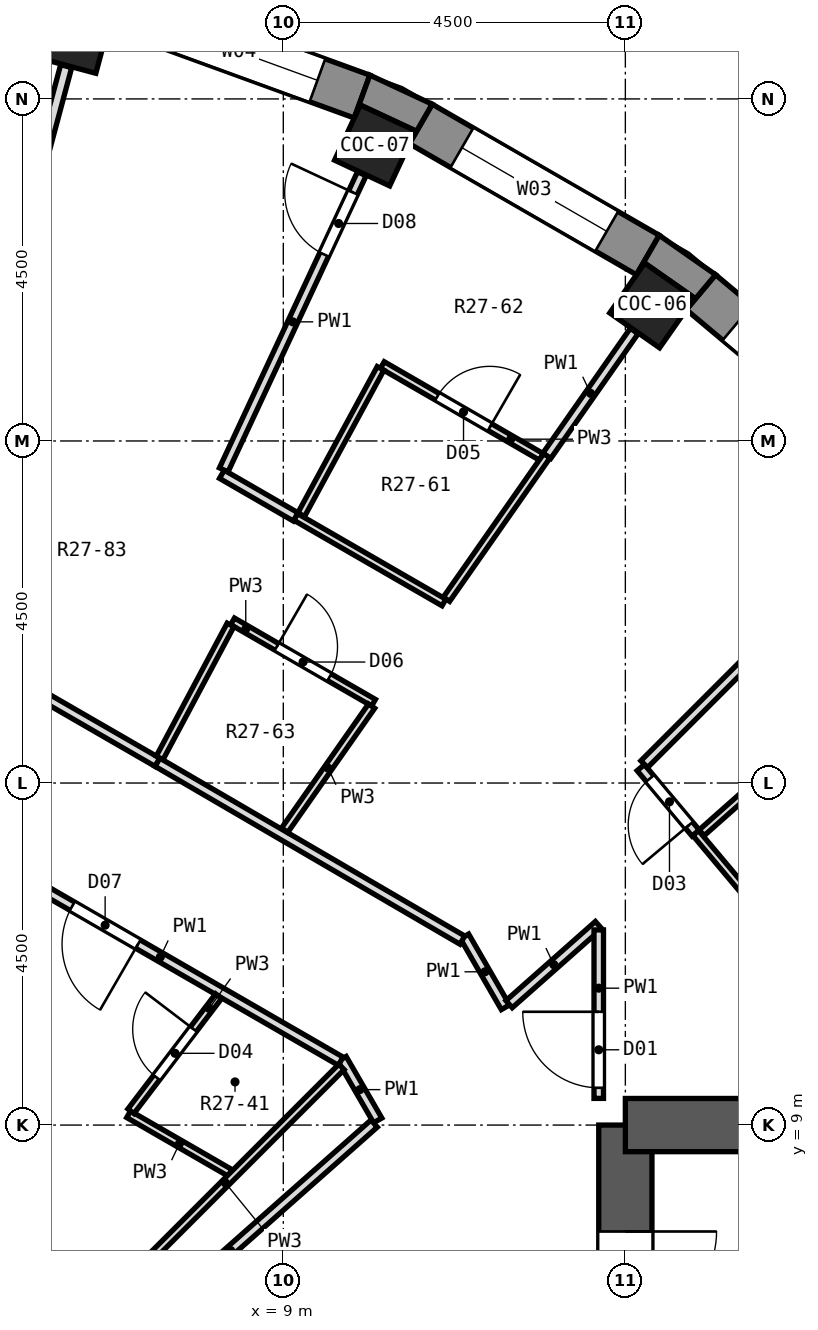
"""IFC4 building model, lengths in metres.
Left out: names, types, materials, properties, quantities, classifications, styles, units other than length and angle.
Written with IfcOpenShell. Run it as: python <this file> out.ifc"""

import sys

from ifc_helpers import new_model, si_unit, direction, frame, frame_2d, origin, origin_2d, place, context, subcontext, project, spatial, polyline, rectangle, outline, extrude, element, fill, save


model = new_model("IFC4")
c1 = context("Model", 3, precision=1e-05, world=origin(), true_north=direction((0.0, 1.0)))
c2 = subcontext(c1, "Body", "Model", "MODEL_VIEW")
j1 = project(units=[si_unit("LENGTHUNIT", "METRE"), si_unit("PLANEANGLEUNIT", "RADIAN")], contexts=[c1])
p1 = place(None, origin())
s1 = spatial("IfcSite", under=j1, at=p1, CompositionType="ELEMENT")
p2 = place(p1, origin())
s2 = spatial("IfcBuilding", under=s1, at=p2, CompositionType="ELEMENT")
p3 = place(p2, frame((0.0, 0.0, 180.6)))
s3 = spatial("IfcBuildingStorey", under=s2, at=p3, CompositionType="ELEMENT", Elevation=180.6)
for number, where, z_axis, x_axis in (
    (1, (13.852, 19.782, 0.0), (0.0, 0.0, 1.0), (0.574, 0.819, 0.0)),
    (2, (10.206, 21.887, 0.0), (0.0, 0.0, 1.0), (0.423, 0.906, 0.0)),
    (3, (6.25, 23.327, 0.0), (0.0, 0.0, 1.0), (0.259, 0.966, 0.0)),
):
    element("IfcColumn", number, at=place(p3, frame(where, z_axis=z_axis, x_axis=x_axis)), inside=s3, PredefinedType="COLUMN", context=c2, shape_type="SweptSolid", body=[
        extrude(rectangle(XDim=0.8, YDim=0.8, at=origin_2d()), origin(), (0.0, 0.0, 1.0), 3.3),
    ])
p4 = place(p3, frame((13.5, -9.0, 0.0), z_axis=(0.0, 0.0, 1.0), x_axis=(0.0, 1.0, 0.0)))
e4 = element("IfcWall", 4, at=p4, inside=s3, PredefinedType="SHEAR", context=c2, shape_type="SweptSolid", body=[
    extrude(rectangle(XDim=18.0, YDim=0.7, at=frame_2d((9.0, 0.0))), origin(), (0.0, 0.0, 1.0), 3.3),
])
p5 = place(p4, frame((15.4, 0.0, 0.0)))
e5 = element("IfcOpeningElement", 5, at=p5, cuts=e4, PredefinedType="OPENING", context=c2, shape_type="SweptSolid", body=[
    extrude(rectangle(XDim=1.2, YDim=2.1, at=frame_2d((0.6, 1.05))), frame((0.0, 0.362, 0.0), z_axis=(0.0, -1.0, 0.0), x_axis=(1.0, 0.0, 0.0)), (0.0, 0.0, 1.0), 0.724),
])
p6 = place(p4, frame((1.4, 0.0, 0.0)))
e6 = element("IfcOpeningElement", 6, at=p6, cuts=e4, PredefinedType="OPENING", context=c2, shape_type="SweptSolid", body=[
    extrude(rectangle(XDim=1.2, YDim=2.1, at=frame_2d((0.6, 1.05))), frame((0.0, 0.362, 0.0), z_axis=(0.0, -1.0, 0.0), x_axis=(1.0, 0.0, 0.0)), (0.0, 0.0, 1.0), 0.724),
])
p7 = place(p4, frame((7.5, 0.0, 0.0)))
e7 = element("IfcOpeningElement", 7, at=p7, cuts=e4, PredefinedType="OPENING", context=c2, shape_type="SweptSolid", body=[
    extrude(rectangle(XDim=3.0, YDim=2.4, at=frame_2d((1.5, 1.2))), frame((0.0, 0.362, 0.0), z_axis=(0.0, -1.0, 0.0), x_axis=(1.0, 0.0, 0.0)), (0.0, 0.0, 1.0), 0.724),
])
p8 = place(p3, frame((13.5, 9.0, 0.0), z_axis=(0.0, 0.0, 1.0), x_axis=(1.0, 0.0, 0.0)))
e8 = element("IfcWall", 8, at=p8, inside=s3, PredefinedType="SHEAR", context=c2, shape_type="SweptSolid", body=[
    extrude(rectangle(XDim=8.0, YDim=0.7, at=frame_2d((4.0, 0.0))), origin(), (0.0, 0.0, 1.0), 3.3),
])
p9 = place(p3, frame((17.137, 17.74, 0.0), z_axis=(0.0, 0.0, 1.0), x_axis=(-0.766058884809, 0.642770398358, 0.0)))
e9 = element("IfcWall", 9, at=p9, inside=s3, PredefinedType="SOLIDWALL", context=c2, shape_type="SweptSolid", body=[
    extrude(rectangle(XDim=3.449, YDim=0.6, at=frame_2d((1.725, 0.0))), origin(), (0.0, 0.0, 1.0), 2.85),
])
p10 = place(p9, frame((0.625, 0.0, 0.9)))
e10 = element("IfcOpeningElement", 10, at=p10, cuts=e9, PredefinedType="OPENING", context=c2, shape_type="SweptSolid", body=[
    extrude(rectangle(XDim=2.2, YDim=1.8, at=frame_2d((1.1, 0.9))), frame((0.0, 0.312, 0.0), z_axis=(0.0, -1.0, 0.0), x_axis=(1.0, 0.0, 0.0)), (0.0, 0.0, 1.0), 0.624),
])
p11 = place(p3, frame((13.796, 20.446, 0.0), z_axis=(0.0, 0.0, 1.0), x_axis=(-0.86602648383, 0.499998129301, 0.0)))
e11 = element("IfcWall", 11, at=p11, inside=s3, PredefinedType="SOLIDWALL", context=c2, shape_type="SweptSolid", body=[
    extrude(rectangle(XDim=3.45, YDim=0.6, at=frame_2d((1.725, 0.0))), origin(), (0.0, 0.0, 1.0), 2.85),
])
p12 = place(p11, frame((0.625, 0.0, 0.9)))
e12 = element("IfcOpeningElement", 12, at=p12, cuts=e11, PredefinedType="OPENING", context=c2, shape_type="SweptSolid", body=[
    extrude(rectangle(XDim=2.2, YDim=1.8, at=frame_2d((1.1, 0.9))), frame((0.0, 0.312, 0.0), z_axis=(0.0, -1.0, 0.0), x_axis=(1.0, 0.0, 0.0)), (0.0, 0.0, 1.0), 0.624),
])
p13 = place(p3, frame((10.036, 22.531, 0.0), z_axis=(0.0, 0.0, 1.0), x_axis=(-0.93968799822, 0.342032843455, 0.0)))
e13 = element("IfcWall", 13, at=p13, inside=s3, PredefinedType="SOLIDWALL", context=c2, shape_type="SweptSolid", body=[
    extrude(rectangle(XDim=3.45, YDim=0.6, at=frame_2d((1.725, 0.0))), origin(), (0.0, 0.0, 1.0), 2.85),
])
p14 = place(p13, frame((0.625, 0.0, 0.9)))
e14 = element("IfcOpeningElement", 14, at=p14, cuts=e13, PredefinedType="OPENING", context=c2, shape_type="SweptSolid", body=[
    extrude(rectangle(XDim=2.2, YDim=1.8, at=frame_2d((1.1, 0.9))), frame((0.0, 0.312, 0.0), z_axis=(0.0, -1.0, 0.0), x_axis=(1.0, 0.0, 0.0)), (0.0, 0.0, 1.0), 0.624),
])
p15 = place(p3, origin())
e15 = element("IfcWall", 15, at=p15, inside=s3, PredefinedType="SOLIDWALL", context=c2, shape_type="SweptSolid", body=[
    extrude(outline(polyline([(14.687, 20.187), (13.946, 20.706), (13.646, 20.186), (13.754, 20.34), (14.409, 19.881), (14.302, 19.727), (14.687, 20.187)])), origin(), (0.0, 0.0, 1.0), 2.85),
])
p16 = place(p3, origin())
e16 = element("IfcWall", 16, at=p16, inside=s3, PredefinedType="SOLIDWALL", context=c2, shape_type="SweptSolid", body=[
    extrude(outline(polyline([(10.139, 22.813), (9.934, 22.249), (10.013, 22.419), (10.738, 22.081), (10.659, 21.911), (10.959, 22.431), (10.139, 22.813)])), origin(), (0.0, 0.0, 1.0), 2.85),
])
p17 = place(p3, frame((5.826, 6.22, 0.0), z_axis=(0.0, 0.0, 1.0), x_axis=(-0.866005929495, 0.500033728941, 0.0)))
e17 = element("IfcWall", 17, at=p17, inside=s3, PredefinedType="SOLIDWALL", context=c2, shape_type="SweptSolid", body=[
    extrude(rectangle(XDim=3.87, YDim=0.6, at=frame_2d((1.935, 0.0))), origin(), (0.0, 0.0, 1.0), 2.85),
])
p18 = place(p17, frame((0.735, 0.0, 0.9)))
e18 = element("IfcOpeningElement", 18, at=p18, cuts=e17, PredefinedType="OPENING", context=c2, shape_type="SweptSolid", body=[
    extrude(rectangle(XDim=2.4, YDim=1.8, at=frame_2d((1.2, 0.9))), frame((0.0, 0.312, 0.0), z_axis=(0.0, -1.0, 0.0), x_axis=(1.0, 0.0, 0.0)), (0.0, 0.0, 1.0), 0.624),
])
p19 = place(p3, frame((11.384, 11.482, 0.0), z_axis=(0.0, 0.0, 1.0), x_axis=(0.500016891966, -0.866015650984, 0.0)))
e19 = element("IfcWall", 19, at=p19, inside=s3, PredefinedType="PARTITIONING", context=c2, shape_type="SweptSolid", body=[
    extrude(rectangle(XDim=1.077, YDim=0.125, at=frame_2d((0.538, 0.0))), origin(), (0.0, 0.0, 1.0), 2.85),
])
p20 = place(p3, frame((9.773, 9.871, 0.0), z_axis=(0.0, 0.0, 1.0), x_axis=(0.501046552025, -0.865420332962, 0.0)))
e20 = element("IfcWall", 20, at=p20, inside=s3, PredefinedType="PARTITIONING", context=c2, shape_type="SweptSolid", body=[
    extrude(rectangle(XDim=0.936, YDim=0.125, at=frame_2d((0.468, 0.0))), origin(), (0.0, 0.0, 1.0), 2.85),
])
p21 = place(p3, frame((14.425, 12.842, 0.0), z_axis=(0.0, 0.0, 1.0), x_axis=(0.642729690631, -0.766093039246, 0.0)))
e21 = element("IfcWall", 21, at=p21, inside=s3, PredefinedType="PARTITIONING", context=c2, shape_type="SweptSolid", body=[
    extrude(rectangle(XDim=2.205, YDim=0.1, at=frame_2d((1.102, 0.0))), origin(), (0.0, 0.0, 1.0), 2.85),
])
p22 = place(p3, frame((13.703, 13.703, 0.0), z_axis=(0.0, 0.0, 1.0), x_axis=(0.642682228496, -0.766132856087, 0.0)))
e22 = element("IfcWall", 22, at=p22, inside=s3, PredefinedType="PARTITIONING", context=c2, shape_type="SweptSolid", body=[
    extrude(rectangle(XDim=1.123, YDim=0.125, at=frame_2d((0.562, 0.0))), origin(), (0.0, 0.0, 1.0), 2.85),
])
p23 = place(p22, frame((0.188, 0.0, 0.0)))
e23 = element("IfcOpeningElement", 23, at=p23, cuts=e22, PredefinedType="OPENING", context=c2, shape_type="SweptSolid", body=[
    extrude(rectangle(XDim=0.8, YDim=2.1, at=frame_2d((0.4, 1.05))), frame((0.0, 0.074, 0.0), z_axis=(0.0, -1.0, 0.0), x_axis=(1.0, 0.0, 0.0)), (0.0, 0.0, 1.0), 0.149),
])
p24 = place(p3, frame((7.343, 13.774, 0.0), z_axis=(0.0, 0.0, 1.0), x_axis=(0.86377127644, -0.503884095796, 0.0)))
e24 = element("IfcWall", 24, at=p24, inside=s3, PredefinedType="PARTITIONING", context=c2, shape_type="SweptSolid", body=[
    extrude(rectangle(XDim=4.646, YDim=0.125, at=frame_2d((2.323, 0.0))), origin(), (0.0, 0.0, 1.0), 2.85),
])
p25 = place(p3, frame((6.965, 9.142, 0.0), z_axis=(0.0, 0.0, 1.0), x_axis=(0.865956409518, -0.500119482538, 0.0)))
e25 = element("IfcWall", 25, at=p25, inside=s3, PredefinedType="PARTITIONING", context=c2, shape_type="SweptSolid", body=[
    extrude(rectangle(XDim=1.543, YDim=0.1, at=frame_2d((0.772, 0.0))), origin(), (0.0, 0.0, 1.0), 2.85),
])
p26 = place(p3, frame((3.529, 13.436, 0.0), z_axis=(0.0, 0.0, 1.0), x_axis=(0.865968995572, -0.500097689165, 0.0)))
e26 = element("IfcWall", 26, at=p26, inside=s3, PredefinedType="PARTITIONING", context=c2, shape_type="SweptSolid", body=[
    extrude(rectangle(XDim=7.19, YDim=0.125, at=frame_2d((3.595, 0.0))), origin(), (0.0, 0.0, 1.0), 2.85),
])
p27 = place(p26, frame((3.112, 0.0, 0.0)))
e27 = element("IfcOpeningElement", 27, at=p27, cuts=e26, PredefinedType="OPENING", context=c2, shape_type="SweptSolid", body=[
    extrude(rectangle(XDim=1.0, YDim=2.1, at=frame_2d((0.5, 1.05))), frame((0.0, 0.074, 0.0), z_axis=(0.0, -1.0, 0.0), x_axis=(1.0, 0.0, 0.0)), (0.0, 0.0, 1.0), 0.149),
])
p28 = place(p3, frame((4.117, 15.636, 0.0), z_axis=(0.0, 0.0, 1.0), x_axis=(0.866036031404, -0.49998159197, 0.0)))
e28 = element("IfcWall", 28, at=p28, inside=s3, PredefinedType="PARTITIONING", context=c2, shape_type="SweptSolid", body=[
    extrude(rectangle(XDim=3.724, YDim=0.125, at=frame_2d((1.862, 0.0))), origin(), (0.0, 0.0, 1.0), 2.85),
])
p29 = place(p3, frame((8.333, 15.627, 0.0), z_axis=(0.0, 0.0, 1.0), x_axis=(0.866024183959, -0.500002112793, 0.0)))
e29 = element("IfcWall", 29, at=p29, inside=s3, PredefinedType="PARTITIONING", context=c2, shape_type="SweptSolid", body=[
    extrude(rectangle(XDim=2.141, YDim=0.1, at=frame_2d((1.071, 0.0))), origin(), (0.0, 0.0, 1.0), 2.85),
])
p30 = place(p29, frame((0.67, 0.0, 0.0)))
e30 = element("IfcOpeningElement", 30, at=p30, cuts=e29, PredefinedType="OPENING", context=c2, shape_type="SweptSolid", body=[
    extrude(rectangle(XDim=0.8, YDim=2.1, at=frame_2d((0.4, 1.05))), frame((0.0, 0.062, 0.0), z_axis=(0.0, -1.0, 0.0), x_axis=(1.0, 0.0, 0.0)), (0.0, 0.0, 1.0), 0.124),
])
p31 = place(p3, frame((9.163, 17.001, 0.0), z_axis=(0.0, 0.0, 1.0), x_axis=(0.866073680794, -0.499916372443, 0.0)))
e31 = element("IfcWall", 31, at=p31, inside=s3, PredefinedType="PARTITIONING", context=c2, shape_type="SweptSolid", body=[
    extrude(rectangle(XDim=2.252, YDim=0.1, at=frame_2d((1.126, 0.0))), origin(), (0.0, 0.0, 1.0), 2.85),
])
p32 = place(p3, frame((8.192, 17.562, 0.0), z_axis=(0.0, 0.0, 1.0), x_axis=(0.865888132195, -0.500237686029, 0.0)))
e32 = element("IfcWall", 32, at=p32, inside=s3, PredefinedType="PARTITIONING", context=c2, shape_type="SweptSolid", body=[
    extrude(rectangle(XDim=1.121, YDim=0.125, at=frame_2d((0.561, 0.0))), origin(), (0.0, 0.0, 1.0), 2.85),
])
p33 = place(p3, frame((10.303, 18.999, 0.0), z_axis=(0.0, 0.0, 1.0), x_axis=(0.865870907928, -0.500267499248, 0.0)))
e33 = element("IfcWall", 33, at=p33, inside=s3, PredefinedType="PARTITIONING", context=c2, shape_type="SweptSolid", body=[
    extrude(rectangle(XDim=2.417, YDim=0.1, at=frame_2d((1.208, 0.0))), origin(), (0.0, 0.0, 1.0), 2.85),
])
p34 = place(p33, frame((0.833, 0.0, 0.0)))
e34 = element("IfcOpeningElement", 34, at=p34, cuts=e33, PredefinedType="OPENING", context=c2, shape_type="SweptSolid", body=[
    extrude(rectangle(XDim=0.8, YDim=2.1, at=frame_2d((0.4, 1.05))), frame((0.0, 0.062, 0.0), z_axis=(0.0, -1.0, 0.0), x_axis=(1.0, 0.0, 0.0)), (0.0, 0.0, 1.0), 0.124),
])
p35 = place(p3, frame((14.504, 12.845, 0.0), z_axis=(0.0, 0.0, 1.0), x_axis=(0.748608753718, 0.663012016374, 0.0)))
e35 = element("IfcWall", 35, at=p35, inside=s3, PredefinedType="PARTITIONING", context=c2, shape_type="SweptSolid", body=[
    extrude(rectangle(XDim=2.188, YDim=0.1, at=frame_2d((1.094, 0.0))), origin(), (0.0, 0.0, 1.0), 2.85),
])
p36 = place(p3, frame((6.42, 5.68, 0.0), z_axis=(0.0, 0.0, 1.0), x_axis=(0.74896790207, 0.662606279527, 0.0)))
e36 = element("IfcWall", 36, at=p36, inside=s3, PredefinedType="PARTITIONING", context=c2, shape_type="SweptSolid", body=[
    extrude(rectangle(XDim=5.041, YDim=0.125, at=frame_2d((2.52, 0.0))), origin(), (0.0, 0.0, 1.0), 2.85),
])
p37 = place(p3, frame((11.97, 10.59, 0.0), z_axis=(0.0, 0.0, 1.0), x_axis=(0.748916466518, 0.66266441445, 0.0)))
e37 = element("IfcWall", 37, at=p37, inside=s3, PredefinedType="PARTITIONING", context=c2, shape_type="SweptSolid", body=[
    extrude(rectangle(XDim=1.571, YDim=0.125, at=frame_2d((0.786, 0.0))), origin(), (0.0, 0.0, 1.0), 2.85),
])
p38 = place(p3, frame((6.712, 6.712, 0.0), z_axis=(0.0, 0.0, 1.0), x_axis=(0.707106781187, 0.707106781187, 0.0)))
e38 = element("IfcWall", 38, at=p38, inside=s3, PredefinedType="PARTITIONING", context=c2, shape_type="SweptSolid", body=[
    extrude(rectangle(XDim=4.318, YDim=0.1, at=frame_2d((2.159, 0.0))), origin(), (0.0, 0.0, 1.0), 2.85),
])
p39 = place(p3, frame((13.748, 13.748, 0.0), z_axis=(0.0, 0.0, 1.0), x_axis=(0.707106781187, 0.707106781187, 0.0)))
e39 = element("IfcWall", 39, at=p39, inside=s3, PredefinedType="PARTITIONING", context=c2, shape_type="SweptSolid", body=[
    extrude(rectangle(XDim=4.297, YDim=0.125, at=frame_2d((2.148, 0.0))), origin(), (0.0, 0.0, 1.0), 2.85),
])
p40 = place(p3, frame((6.995, 9.182, 0.0), z_axis=(0.0, 0.0, 1.0), x_axis=(0.606016164932, 0.795452329081, 0.0)))
e40 = element("IfcWall", 40, at=p40, inside=s3, PredefinedType="PARTITIONING", context=c2, shape_type="SweptSolid", body=[
    extrude(rectangle(XDim=1.904, YDim=0.1, at=frame_2d((0.952, 0.0))), origin(), (0.0, 0.0, 1.0), 2.85),
])
p41 = place(p40, frame((0.558, 0.0, 0.0)))
e41 = element("IfcOpeningElement", 41, at=p41, cuts=e40, PredefinedType="OPENING", context=c2, shape_type="SweptSolid", body=[
    extrude(rectangle(XDim=0.8, YDim=2.1, at=frame_2d((0.4, 1.05))), frame((0.0, 0.062, 0.0), z_axis=(0.0, -1.0, 0.0), x_axis=(1.0, 0.0, 0.0)), (0.0, 0.0, 1.0), 0.124),
])
p42 = place(p3, frame((11.147, 15.918, 0.0), z_axis=(0.0, 0.0, 1.0), x_axis=(0.573270276117, 0.819366334749, 0.0)))
e42 = element("IfcWall", 42, at=p42, inside=s3, PredefinedType="PARTITIONING", context=c2, shape_type="SweptSolid", body=[
    extrude(rectangle(XDim=2.303, YDim=0.1, at=frame_2d((1.152, 0.0))), origin(), (0.0, 0.0, 1.0), 2.85),
])
p43 = place(p3, frame((9.018, 12.879, 0.0), z_axis=(0.0, 0.0, 1.0), x_axis=(0.573717150032, 0.819053497495, 0.0)))
e43 = element("IfcWall", 43, at=p43, inside=s3, PredefinedType="PARTITIONING", context=c2, shape_type="SweptSolid", body=[
    extrude(rectangle(XDim=1.993, YDim=0.1, at=frame_2d((0.997, 0.0))), origin(), (0.0, 0.0, 1.0), 2.85),
])
p44 = place(p3, frame((12.468, 17.806, 0.0), z_axis=(0.0, 0.0, 1.0), x_axis=(0.573568678046, 0.819157476658, 0.0)))
e44 = element("IfcWall", 44, at=p44, inside=s3, PredefinedType="PARTITIONING", context=c2, shape_type="SweptSolid", body=[
    extrude(rectangle(XDim=2.003, YDim=0.125, at=frame_2d((1.001, 0.0))), origin(), (0.0, 0.0, 1.0), 2.85),
])
p45 = place(p3, frame((9.236, 17.031, 0.0), z_axis=(0.0, 0.0, 1.0), x_axis=(0.476638861042, 0.87909919585, 0.0)))
e45 = element("IfcWall", 45, at=p45, inside=s3, PredefinedType="PARTITIONING", context=c2, shape_type="SweptSolid", body=[
    extrude(rectangle(XDim=2.189, YDim=0.1, at=frame_2d((1.094, 0.0))), origin(), (0.0, 0.0, 1.0), 2.85),
])
p46 = place(p3, frame((7.374, 13.831, 0.0), z_axis=(0.0, 0.0, 1.0), x_axis=(0.470274863267, 0.882520001461, 0.0)))
e46 = element("IfcWall", 46, at=p46, inside=s3, PredefinedType="PARTITIONING", context=c2, shape_type="SweptSolid", body=[
    extrude(rectangle(XDim=1.982, YDim=0.1, at=frame_2d((0.991, 0.0))), origin(), (0.0, 0.0, 1.0), 2.85),
])
p47 = place(p3, frame((8.216, 17.62, 0.0), z_axis=(0.0, 0.0, 1.0), x_axis=(0.422602512205, 0.906315130999, 0.0)))
e47 = element("IfcWall", 47, at=p47, inside=s3, PredefinedType="PARTITIONING", context=c2, shape_type="SweptSolid", body=[
    extrude(rectangle(XDim=4.299, YDim=0.125, at=frame_2d((2.149, 0.0))), origin(), (0.0, 0.0, 1.0), 2.85),
])
p48 = place(p47, frame((3.127, 0.0, 0.0)))
e48 = element("IfcOpeningElement", 48, at=p48, cuts=e47, PredefinedType="OPENING", context=c2, shape_type="SweptSolid", body=[
    extrude(rectangle(XDim=0.9, YDim=2.1, at=frame_2d((0.45, 1.05))), frame((0.0, 0.074, 0.0), z_axis=(0.0, -1.0, 0.0), x_axis=(1.0, 0.0, 0.0)), (0.0, 0.0, 1.0), 0.149),
])
p49 = place(p3, frame((4.198, 15.663, 0.0), z_axis=(0.0, 0.0, 1.0), x_axis=(0.258633906583, 0.96597541499, 0.0)))
e49 = element("IfcWall", 49, at=p49, inside=s3, PredefinedType="PARTITIONING", context=c2, shape_type="SweptSolid", body=[
    extrude(rectangle(XDim=7.524, YDim=0.15, at=frame_2d((3.762, 0.0))), origin(), (0.0, 0.0, 1.0), 2.85),
])
p50 = place(p3, frame((13.15, 9.351, 0.0), z_axis=(0.0, 0.0, 1.0), x_axis=(0.0, 1.0, 0.0)))
e50 = element("IfcWall", 50, at=p50, inside=s3, PredefinedType="PARTITIONING", context=c2, shape_type="SweptSolid", body=[
    extrude(rectangle(XDim=2.216, YDim=0.125, at=frame_2d((1.108, 0.0))), origin(), (0.0, 0.0, 1.0), 2.85),
])
p51 = place(p50, frame((0.139, 0.0, 0.0)))
e51 = element("IfcOpeningElement", 51, at=p51, cuts=e50, PredefinedType="OPENING", context=c2, shape_type="SweptSolid", body=[
    extrude(rectangle(XDim=1.0, YDim=2.1, at=frame_2d((0.5, 1.05))), frame((0.0, 0.074, 0.0), z_axis=(0.0, -1.0, 0.0), x_axis=(1.0, 0.0, 0.0)), (0.0, 0.0, 1.0), 0.149),
])
p52 = place(p10, origin())
e52 = element("IfcWindow", 52, at=p52, inside=s3, PartitioningType="SINGLE_PANEL", PredefinedType="WINDOW", context=c2, shape_type="SweptSolid", body=[
    extrude(rectangle(XDim=2.2, YDim=1.8, at=frame_2d((1.1, 0.9))), frame((0.0, 0.18, 0.0), z_axis=(0.0, -1.0, 0.0), x_axis=(1.0, 0.0, 0.0)), (0.0, 0.0, 1.0), 0.06),
])
fill(e10, e52)
p53 = place(p12, origin())
e53 = element("IfcWindow", 53, at=p53, inside=s3, PartitioningType="SINGLE_PANEL", PredefinedType="WINDOW", context=c2, shape_type="SweptSolid", body=[
    extrude(rectangle(XDim=2.2, YDim=1.8, at=frame_2d((1.1, 0.9))), frame((0.0, 0.18, 0.0), z_axis=(0.0, -1.0, 0.0), x_axis=(1.0, 0.0, 0.0)), (0.0, 0.0, 1.0), 0.06),
])
fill(e12, e53)
p54 = place(p14, origin())
e54 = element("IfcWindow", 54, at=p54, inside=s3, PartitioningType="SINGLE_PANEL", PredefinedType="WINDOW", context=c2, shape_type="SweptSolid", body=[
    extrude(rectangle(XDim=2.2, YDim=1.8, at=frame_2d((1.1, 0.9))), frame((0.0, 0.18, 0.0), z_axis=(0.0, -1.0, 0.0), x_axis=(1.0, 0.0, 0.0)), (0.0, 0.0, 1.0), 0.06),
])
fill(e14, e54)
p55 = place(p51, origin())
e55 = element("IfcDoor", 55, at=p55, inside=s3, OperationType="SINGLE_SWING_RIGHT", PredefinedType="DOOR", context=c2, shape_type="SweptSolid", body=[
    extrude(rectangle(XDim=1.0, YDim=2.1, at=frame_2d((0.5, 1.05))), frame((0.0, 0.025, 0.0), z_axis=(0.0, -1.0, 0.0), x_axis=(1.0, 0.0, 0.0)), (0.0, 0.0, 1.0), 0.05),
])
fill(e51, e55)
p56 = place(p23, frame((0.8, 0.0, 0.0), z_axis=(0.0, 0.0, 1.0), x_axis=(-1.0, 0.0, 0.0)))
e56 = element("IfcDoor", 56, at=p56, inside=s3, OperationType="SINGLE_SWING_LEFT", PredefinedType="DOOR", context=c2, shape_type="SweptSolid", body=[
    extrude(rectangle(XDim=0.8, YDim=2.1, at=frame_2d((0.4, 1.05))), frame((0.0, 0.025, 0.0), z_axis=(0.0, -1.0, 0.0), x_axis=(1.0, 0.0, 0.0)), (0.0, 0.0, 1.0), 0.05),
])
fill(e23, e56)
p57 = place(p41, origin())
e57 = element("IfcDoor", 57, at=p57, inside=s3, OperationType="SINGLE_SWING_RIGHT", PredefinedType="DOOR", context=c2, shape_type="SweptSolid", body=[
    extrude(rectangle(XDim=0.8, YDim=2.1, at=frame_2d((0.4, 1.05))), frame((0.0, 0.025, 0.0), z_axis=(0.0, -1.0, 0.0), x_axis=(1.0, 0.0, 0.0)), (0.0, 0.0, 1.0), 0.05),
])
fill(e41, e57)
p58 = place(p34, origin())
e58 = element("IfcDoor", 58, at=p58, inside=s3, OperationType="SINGLE_SWING_RIGHT", PredefinedType="DOOR", context=c2, shape_type="SweptSolid", body=[
    extrude(rectangle(XDim=0.8, YDim=2.1, at=frame_2d((0.4, 1.05))), frame((0.0, 0.025, 0.0), z_axis=(0.0, -1.0, 0.0), x_axis=(1.0, 0.0, 0.0)), (0.0, 0.0, 1.0), 0.05),
])
fill(e34, e58)
p59 = place(p30, origin())
e59 = element("IfcDoor", 59, at=p59, inside=s3, OperationType="SINGLE_SWING_LEFT", PredefinedType="DOOR", context=c2, shape_type="SweptSolid", body=[
    extrude(rectangle(XDim=0.8, YDim=2.1, at=frame_2d((0.4, 1.05))), frame((0.0, 0.025, 0.0), z_axis=(0.0, -1.0, 0.0), x_axis=(1.0, 0.0, 0.0)), (0.0, 0.0, 1.0), 0.05),
])
fill(e30, e59)
p60 = place(p27, frame((1.0, 0.0, 0.0), z_axis=(0.0, 0.0, 1.0), x_axis=(-1.0, 0.0, 0.0)))
e60 = element("IfcDoor", 60, at=p60, inside=s3, OperationType="SINGLE_SWING_LEFT", PredefinedType="DOOR", context=c2, shape_type="SweptSolid", body=[
    extrude(rectangle(XDim=1.0, YDim=2.1, at=frame_2d((0.5, 1.05))), frame((0.0, 0.025, 0.0), z_axis=(0.0, -1.0, 0.0), x_axis=(1.0, 0.0, 0.0)), (0.0, 0.0, 1.0), 0.05),
])
fill(e27, e60)
p61 = place(p48, origin())
e61 = element("IfcDoor", 61, at=p61, inside=s3, OperationType="SINGLE_SWING_RIGHT", PredefinedType="DOOR", context=c2, shape_type="SweptSolid", body=[
    extrude(rectangle(XDim=0.9, YDim=2.1, at=frame_2d((0.45, 1.05))), frame((0.0, 0.025, 0.0), z_axis=(0.0, -1.0, 0.0), x_axis=(1.0, 0.0, 0.0)), (0.0, 0.0, 1.0), 0.05),
])
fill(e48, e61)
p62 = place(p5, frame((1.2, 0.0, 0.0), z_axis=(0.0, 0.0, 1.0), x_axis=(-1.0, 0.0, 0.0)))
e62 = element("IfcDoor", 62, at=p62, inside=s3, OperationType="SINGLE_SWING_LEFT", PredefinedType="DOOR", context=c2, shape_type="SweptSolid", body=[
    extrude(rectangle(XDim=1.2, YDim=2.1, at=frame_2d((0.6, 1.05))), frame((0.0, 0.025, 0.0), z_axis=(0.0, -1.0, 0.0), x_axis=(1.0, 0.0, 0.0)), (0.0, 0.0, 1.0), 0.05),
])
fill(e5, e62)
save(model, sys.argv[1])
